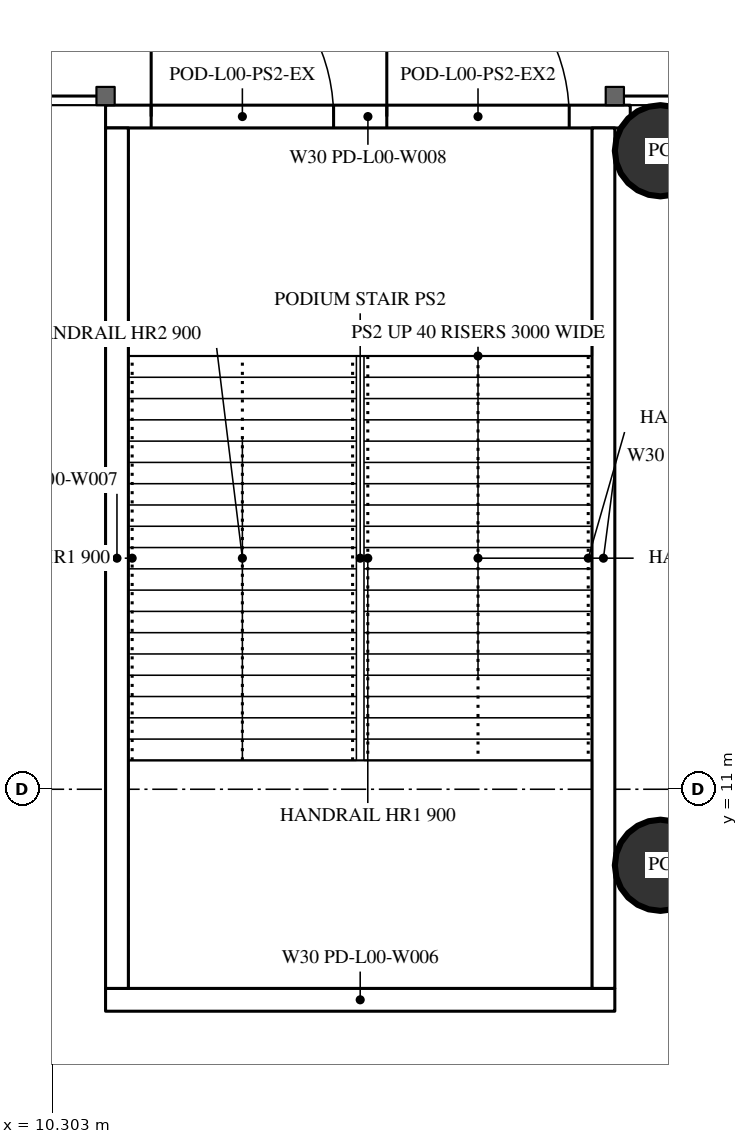
"""IFC4 building model, lengths in metres.
Left out: names, types, materials, properties, quantities, classifications, styles, units other than length and angle.
Written with IfcOpenShell. Run it as: python <this file> out.ifc"""

import sys

from ifc_helpers import new_model, si_unit, direction, frame, frame_2d, origin, origin_2d, place, context, subcontext, project, spatial, rectangle, circle, extrude, element, fill, save


model = new_model("IFC4")
c1 = context("Model", 3, precision=1e-05, world=origin(), true_north=direction((0.0, 1.0)))
c2 = subcontext(c1, "Body", "Model", "MODEL_VIEW")
j1 = project(units=[si_unit("LENGTHUNIT", "METRE"), si_unit("PLANEANGLEUNIT", "RADIAN")], contexts=[c1])
p1 = place(None, origin())
s1 = spatial("IfcSite", under=j1, at=p1, CompositionType="ELEMENT")
p2 = place(p1, origin())
s2 = spatial("IfcBuilding", under=s1, at=p2, CompositionType="ELEMENT")
p3 = place(p2, origin())
s3 = spatial("IfcBuildingStorey", under=s2, at=p3, CompositionType="ELEMENT", Elevation=0.0)
for number, where, z_axis, x_axis in (
    (1, (18.3, 10.0, 0.0), (0.0, 0.0, 1.0), (1.0, 0.0, 0.0)),
    (2, (18.3, 19.4, 0.0), (0.0, 0.0, 1.0), (1.0, 0.0, 0.0)),
):
    element("IfcColumn", number, at=place(p3, frame(where, z_axis=z_axis, x_axis=x_axis)), inside=s3, PredefinedType="COLUMN", context=c2, shape_type="SweptSolid", body=[
        extrude(circle(Radius=0.6, at=origin_2d()), origin(), (0.0, 0.0, 1.0), 7.2),
    ])
p4 = place(p3, frame((11.0, 19.85, 0.0), z_axis=(0.0, 0.0, 1.0), x_axis=(1.0, 0.0, 0.0)))
e3 = element("IfcWall", 3, at=p4, inside=s3, PredefinedType="SOLIDWALL", context=c2, shape_type="SweptSolid", body=[
    extrude(rectangle(XDim=6.903, YDim=0.3, at=frame_2d((3.452, 0.0))), origin(), (0.0, 0.0, 1.0), 5.95),
])
p5 = place(p4, frame((0.6, 0.0, 0.0)))
e4 = element("IfcOpeningElement", 4, at=p5, cuts=e3, PredefinedType="OPENING", context=c2, shape_type="SweptSolid", body=[
    extrude(rectangle(XDim=2.4, YDim=2.2, at=frame_2d((1.2, 1.1))), frame((0.0, 0.16, 0.0), z_axis=(0.0, -1.0, 0.0), x_axis=(1.0, 0.0, 0.0)), (0.0, 0.0, 1.0), 0.32),
])
p6 = place(p4, frame((3.7, 0.0, 0.0)))
e5 = element("IfcOpeningElement", 5, at=p6, cuts=e3, PredefinedType="OPENING", context=c2, shape_type="SweptSolid", body=[
    extrude(rectangle(XDim=2.4, YDim=2.2, at=frame_2d((1.2, 1.1))), frame((0.0, 0.16, 0.0), z_axis=(0.0, -1.0, 0.0), x_axis=(1.0, 0.0, 0.0)), (0.0, 0.0, 1.0), 0.32),
])
p7 = place(p3, frame((11.0, 8.23, 0.0), z_axis=(0.0, 0.0, 1.0), x_axis=(1.0, 0.0, 0.0)))
e6 = element("IfcWall", 6, at=p7, inside=s3, PredefinedType="SOLIDWALL", context=c2, shape_type="SweptSolid", body=[
    extrude(rectangle(XDim=6.7, YDim=0.3, at=frame_2d((3.35, 0.0))), origin(), (0.0, 0.0, 1.0), 6.85),
])
for number, where, z_axis, x_axis in (
    (7, (11.15, 8.38, 0.0), (0.0, 0.0, 1.0), (0.0, 1.0, 0.0)),
    (8, (17.55, 8.38, 0.0), (0.0, 0.0, 1.0), (0.0, 1.0, 0.0)),
):
    element("IfcWall", number, at=place(p3, frame(where, z_axis=z_axis, x_axis=x_axis)), inside=s3, PredefinedType="SOLIDWALL", context=c2, shape_type="SweptSolid", body=[
        extrude(rectangle(XDim=11.32, YDim=0.3, at=frame_2d((5.66, 0.0))), origin(), (0.0, 0.0, 1.0), 6.85),
    ])
p8 = place(p5, origin())
e9 = element("IfcDoor", 9, at=p8, inside=s3, OperationType="DOUBLE_DOOR_SINGLE_SWING", PredefinedType="DOOR", context=c2, shape_type="SweptSolid", body=[
    extrude(rectangle(XDim=2.4, YDim=2.2, at=frame_2d((1.2, 1.1))), frame((0.0, 0.025, 0.0), z_axis=(0.0, -1.0, 0.0), x_axis=(1.0, 0.0, 0.0)), (0.0, 0.0, 1.0), 0.05),
])
fill(e4, e9)
p9 = place(p6, origin())
e10 = element("IfcDoor", 10, at=p9, inside=s3, OperationType="DOUBLE_DOOR_SINGLE_SWING", PredefinedType="DOOR", context=c2, shape_type="SweptSolid", body=[
    extrude(rectangle(XDim=2.4, YDim=2.2, at=frame_2d((1.2, 1.1))), frame((0.0, 0.025, 0.0), z_axis=(0.0, -1.0, 0.0), x_axis=(1.0, 0.0, 0.0)), (0.0, 0.0, 1.0), 0.05),
])
fill(e5, e10)
save(model, sys.argv[1])
